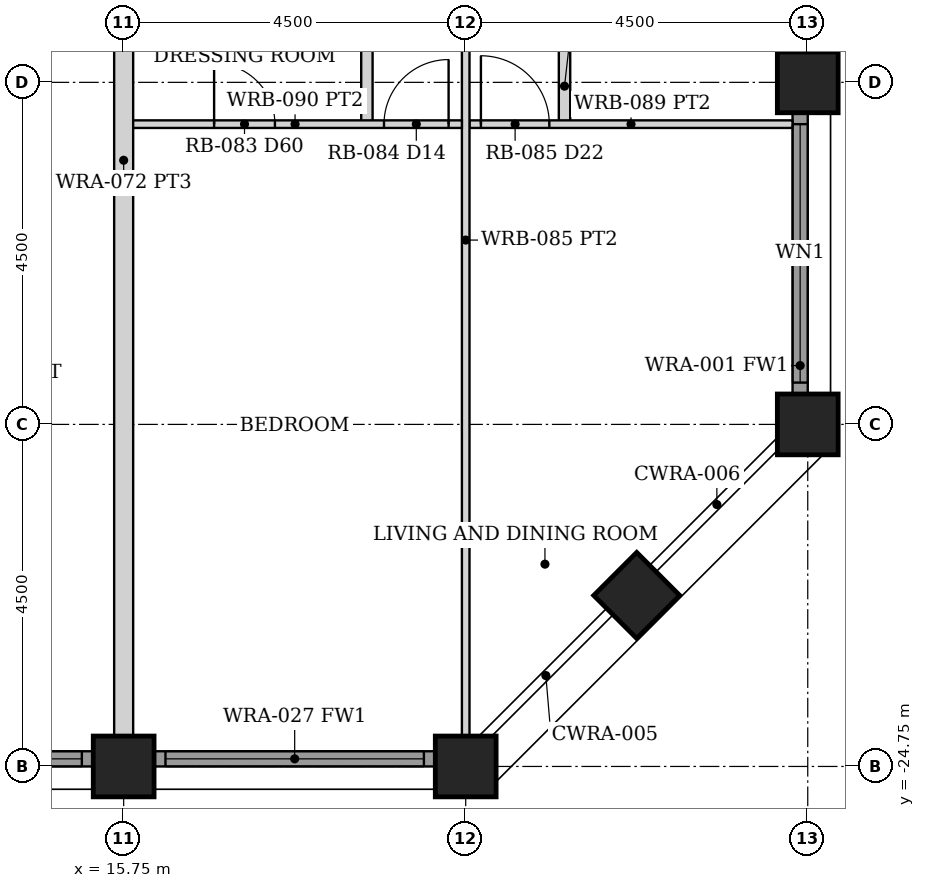
"""IFC4 building model, lengths in metres.
Left out: names, types, materials, properties, quantities, classifications, styles, units other than length and angle.
Written with IfcOpenShell. Run it as: python <this file> out.ifc"""

import sys

from ifc_helpers import new_model, si_unit, direction, frame, frame_2d, origin, origin_2d, place, context, subcontext, project, spatial, rectangle, hollow_rectangle, extrude, element, fill, save


model = new_model("IFC4")
c1 = context("Model", 3, precision=1e-05, world=origin(), true_north=direction((0.0, 1.0)))
c2 = subcontext(c1, "Body", "Model", "MODEL_VIEW")
j1 = project(units=[si_unit("LENGTHUNIT", "METRE"), si_unit("PLANEANGLEUNIT", "RADIAN")], contexts=[c1])
p1 = place(None, origin())
s1 = spatial("IfcSite", under=j1, at=p1, CompositionType="ELEMENT")
p2 = place(p1, origin())
s2 = spatial("IfcBuilding", under=s1, at=p2, CompositionType="ELEMENT")
p3 = place(p2, frame((0.0, 0.0, 37.0)))
s3 = spatial("IfcBuildingStorey", under=s2, at=p3, CompositionType="ELEMENT", Elevation=37.0)
for number, where, z_axis, x_axis in (
    (1, (24.75, -20.25, 0.0), (0.0, 0.0, 1.0), (1.0, 0.0, 0.0)),
    (2, (24.75, -15.75, 0.0), (0.0, 0.0, 1.0), (1.0, 0.0, 0.0)),
    (3, (15.75, -24.75, 0.0), (0.0, 0.0, 1.0), (0.0, 1.0, 0.0)),
    (4, (20.25, -24.75, 0.0), (0.0, 0.0, 1.0), (0.0, 1.0, 0.0)),
    (5, (22.5, -22.5, 0.0), (0.0, 0.0, 1.0), (0.707, -0.707, 0.0)),
):
    element("IfcColumn", number, at=place(p3, frame(where, z_axis=z_axis, x_axis=x_axis)), inside=s3, PredefinedType="COLUMN", context=c2, shape_type="SweptSolid", body=[
        extrude(hollow_rectangle(XDim=0.8, YDim=0.8, WallThickness=0.07, at=origin_2d()), origin(), (0.0, 0.0, 1.0), 3.5),
    ])
p4 = place(p3, frame((11.655, -24.65, 0.0), z_axis=(0.0, 0.0, 1.0), x_axis=(1.0, 0.0, 0.0)))
e6 = element("IfcWall", 6, at=p4, inside=s3, PredefinedType="SOLIDWALL", context=c2, shape_type="SweptSolid", body=[
    extrude(rectangle(XDim=3.69, YDim=0.2, at=frame_2d((1.845, 0.0))), origin(), (0.0, 0.0, 1.0), 2.379),
])
p5 = place(p4, frame((0.145, 0.0, 0.3)))
e7 = element("IfcOpeningElement", 7, at=p5, cuts=e6, PredefinedType="OPENING", context=c2, shape_type="SweptSolid", body=[
    extrude(rectangle(XDim=3.4, YDim=1.929, at=frame_2d((1.7, 0.964))), frame((0.0, 0.11, 0.0), z_axis=(0.0, -1.0, 0.0), x_axis=(1.0, 0.0, 0.0)), (0.0, 0.0, 1.0), 0.22),
])
p6 = place(p3, frame((16.155, -24.65, 0.0), z_axis=(0.0, 0.0, 1.0), x_axis=(1.0, 0.0, 0.0)))
e8 = element("IfcWall", 8, at=p6, inside=s3, PredefinedType="SOLIDWALL", context=c2, shape_type="SweptSolid", body=[
    extrude(rectangle(XDim=3.69, YDim=0.2, at=frame_2d((1.845, 0.0))), origin(), (0.0, 0.0, 1.0), 2.379),
])
p7 = place(p6, frame((0.145, 0.0, 0.3)))
e9 = element("IfcOpeningElement", 9, at=p7, cuts=e8, PredefinedType="OPENING", context=c2, shape_type="SweptSolid", body=[
    extrude(rectangle(XDim=3.4, YDim=1.929, at=frame_2d((1.7, 0.964))), frame((0.0, 0.11, 0.0), z_axis=(0.0, -1.0, 0.0), x_axis=(1.0, 0.0, 0.0)), (0.0, 0.0, 1.0), 0.22),
])
p8 = place(p3, frame((24.65, -19.845, 0.0), z_axis=(0.0, 0.0, 1.0), x_axis=(0.0, 1.0, 0.0)))
e10 = element("IfcWall", 10, at=p8, inside=s3, PredefinedType="SOLIDWALL", context=c2, shape_type="SweptSolid", body=[
    extrude(rectangle(XDim=3.69, YDim=0.2, at=frame_2d((1.845, 0.0))), origin(), (0.0, 0.0, 1.0), 2.379),
])
p9 = place(p8, frame((0.145, 0.0, 0.3)))
e11 = element("IfcOpeningElement", 11, at=p9, cuts=e10, PredefinedType="OPENING", context=c2, shape_type="SweptSolid", body=[
    extrude(rectangle(XDim=3.4, YDim=1.929, at=frame_2d((1.7, 0.964))), frame((0.0, 0.11, 0.0), z_axis=(0.0, -1.0, 0.0), x_axis=(1.0, 0.0, 0.0)), (0.0, 0.0, 1.0), 0.22),
])
p10 = place(p3, frame((21.55, -16.3, 0.0), z_axis=(0.0, 0.0, 1.0), x_axis=(0.0, 1.0, 0.0)))
e12 = element("IfcWall", 12, at=p10, inside=s3, PredefinedType="PARTITIONING", context=c2, shape_type="SweptSolid", body=[
    extrude(rectangle(XDim=5.0, YDim=0.15, at=frame_2d((2.5, 0.0))), origin(), (0.0, 0.0, 1.0), 2.373),
])
p11 = place(p10, frame((2.05, 0.0, 0.0)))
e13 = element("IfcOpeningElement", 13, at=p11, cuts=e12, PredefinedType="OPENING", context=c2, shape_type="SweptSolid", body=[
    extrude(rectangle(XDim=0.9, YDim=2.1, at=frame_2d((0.45, 1.05))), frame((0.0, 0.085, 0.0), z_axis=(0.0, -1.0, 0.0), x_axis=(1.0, 0.0, 0.0)), (0.0, 0.0, 1.0), 0.17),
])
p12 = place(p3, frame((20.3, -16.3, 0.0), z_axis=(0.0, 0.0, 1.0), x_axis=(1.0, 0.0, 0.0)))
e14 = element("IfcWall", 14, at=p12, inside=s3, PredefinedType="PARTITIONING", context=c2, shape_type="SweptSolid", body=[
    extrude(rectangle(XDim=4.25, YDim=0.1, at=frame_2d((2.125, 0.0))), origin(), (0.0, 0.0, 1.0), 2.373),
])
p13 = place(p12, frame((0.15, 0.0, 0.0)))
e15 = element("IfcOpeningElement", 15, at=p13, cuts=e14, PredefinedType="OPENING", context=c2, shape_type="SweptSolid", body=[
    extrude(rectangle(XDim=0.9, YDim=2.1, at=frame_2d((0.45, 1.05))), frame((0.0, 0.06, 0.0), z_axis=(0.0, -1.0, 0.0), x_axis=(1.0, 0.0, 0.0)), (0.0, 0.0, 1.0), 0.12),
])
p14 = place(p3, frame((20.25, -24.35, 0.0), z_axis=(0.0, 0.0, 1.0), x_axis=(0.0, 1.0, 0.0)))
e16 = element("IfcWall", 16, at=p14, inside=s3, PredefinedType="PARTITIONING", context=c2, shape_type="SweptSolid", body=[
    extrude(rectangle(XDim=13.05, YDim=0.1, at=frame_2d((6.525, 0.0))), origin(), (0.0, 0.0, 1.0), 2.373),
])
p15 = place(p3, frame((18.95, -16.3, 0.0), z_axis=(0.0, 0.0, 1.0), x_axis=(0.0, 1.0, 0.0)))
e17 = element("IfcWall", 17, at=p15, inside=s3, PredefinedType="PARTITIONING", context=c2, shape_type="SweptSolid", body=[
    extrude(rectangle(XDim=5.0, YDim=0.15, at=frame_2d((2.5, 0.0))), origin(), (0.0, 0.0, 1.0), 2.373),
])
p16 = place(p15, frame((3.25, 0.0, 0.0)))
e18 = element("IfcOpeningElement", 18, at=p16, cuts=e17, PredefinedType="OPENING", context=c2, shape_type="SweptSolid", body=[
    extrude(rectangle(XDim=0.9, YDim=2.1, at=frame_2d((0.45, 1.05))), frame((0.0, 0.085, 0.0), z_axis=(0.0, -1.0, 0.0), x_axis=(1.0, 0.0, 0.0)), (0.0, 0.0, 1.0), 0.17),
])
p17 = place(p3, frame((15.81, -16.3, 0.0), z_axis=(0.0, 0.0, 1.0), x_axis=(1.0, 0.0, 0.0)))
e19 = element("IfcWall", 19, at=p17, inside=s3, PredefinedType="PARTITIONING", context=c2, shape_type="SweptSolid", body=[
    extrude(rectangle(XDim=4.39, YDim=0.1, at=frame_2d((2.195, 0.0))), origin(), (0.0, 0.0, 1.0), 2.373),
])
p18 = place(p17, frame((3.365, 0.0, 0.0)))
e20 = element("IfcOpeningElement", 20, at=p18, cuts=e19, PredefinedType="OPENING", context=c2, shape_type="SweptSolid", body=[
    extrude(rectangle(XDim=0.85, YDim=2.1, at=frame_2d((0.425, 1.05))), frame((0.0, 0.06, 0.0), z_axis=(0.0, -1.0, 0.0), x_axis=(1.0, 0.0, 0.0)), (0.0, 0.0, 1.0), 0.12),
])
p19 = place(p17, frame((1.13, 0.0, 0.0)))
e21 = element("IfcOpeningElement", 21, at=p19, cuts=e19, PredefinedType="OPENING", context=c2, shape_type="SweptSolid", body=[
    extrude(rectangle(XDim=0.8, YDim=2.1, at=frame_2d((0.4, 1.05))), frame((0.0, 0.06, 0.0), z_axis=(0.0, -1.0, 0.0), x_axis=(1.0, 0.0, 0.0)), (0.0, 0.0, 1.0), 0.12),
])
p20 = place(p3, frame((15.75, -24.35, 0.0), z_axis=(0.0, 0.0, 1.0), x_axis=(0.0, 1.0, 0.0)))
e22 = element("IfcWall", 22, at=p20, inside=s3, PredefinedType="PARTITIONING", context=c2, shape_type="SweptSolid", body=[
    extrude(rectangle(XDim=15.15, YDim=0.25, at=frame_2d((7.575, 0.0))), origin(), (0.0, 0.0, 1.0), 2.373),
])
p21 = place(p5, origin())
e23 = element("IfcWindow", 23, at=p21, inside=s3, PartitioningType="SINGLE_PANEL", PredefinedType="WINDOW", context=c2, shape_type="SweptSolid", body=[
    extrude(rectangle(XDim=3.4, YDim=1.929, at=frame_2d((1.7, 0.964))), frame((0.0, 0.03, 0.0), z_axis=(0.0, -1.0, 0.0), x_axis=(1.0, 0.0, 0.0)), (0.0, 0.0, 1.0), 0.06),
])
fill(e7, e23)
p22 = place(p7, origin())
e24 = element("IfcWindow", 24, at=p22, inside=s3, PartitioningType="SINGLE_PANEL", PredefinedType="WINDOW", context=c2, shape_type="SweptSolid", body=[
    extrude(rectangle(XDim=3.4, YDim=1.929, at=frame_2d((1.7, 0.964))), frame((0.0, 0.03, 0.0), z_axis=(0.0, -1.0, 0.0), x_axis=(1.0, 0.0, 0.0)), (0.0, 0.0, 1.0), 0.06),
])
fill(e9, e24)
p23 = place(p9, origin())
e25 = element("IfcWindow", 25, at=p23, inside=s3, PartitioningType="SINGLE_PANEL", PredefinedType="WINDOW", context=c2, shape_type="SweptSolid", body=[
    extrude(rectangle(XDim=3.4, YDim=1.929, at=frame_2d((1.7, 0.964))), frame((0.0, 0.03, 0.0), z_axis=(0.0, -1.0, 0.0), x_axis=(1.0, 0.0, 0.0)), (0.0, 0.0, 1.0), 0.06),
])
fill(e11, e25)
p24 = place(p13, origin())
e26 = element("IfcDoor", 26, at=p24, inside=s3, OperationType="SINGLE_SWING_LEFT", PredefinedType="DOOR", context=c2, shape_type="SweptSolid", body=[
    extrude(rectangle(XDim=0.9, YDim=2.1, at=frame_2d((0.45, 1.05))), frame((0.0, 0.025, 0.0), z_axis=(0.0, -1.0, 0.0), x_axis=(1.0, 0.0, 0.0)), (0.0, 0.0, 1.0), 0.05),
])
fill(e15, e26)
p25 = place(p18, origin())
e27 = element("IfcDoor", 27, at=p25, inside=s3, OperationType="SINGLE_SWING_RIGHT", PredefinedType="DOOR", context=c2, shape_type="SweptSolid", body=[
    extrude(rectangle(XDim=0.85, YDim=2.1, at=frame_2d((0.425, 1.05))), frame((0.0, 0.025, 0.0), z_axis=(0.0, -1.0, 0.0), x_axis=(1.0, 0.0, 0.0)), (0.0, 0.0, 1.0), 0.05),
])
fill(e20, e27)
p26 = place(p19, origin())
e28 = element("IfcDoor", 28, at=p26, inside=s3, OperationType="SINGLE_SWING_LEFT", PredefinedType="DOOR", context=c2, shape_type="SweptSolid", body=[
    extrude(rectangle(XDim=0.8, YDim=2.1, at=frame_2d((0.4, 1.05))), frame((0.0, 0.025, 0.0), z_axis=(0.0, -1.0, 0.0), x_axis=(1.0, 0.0, 0.0)), (0.0, 0.0, 1.0), 0.05),
])
fill(e21, e28)
save(model, sys.argv[1])
